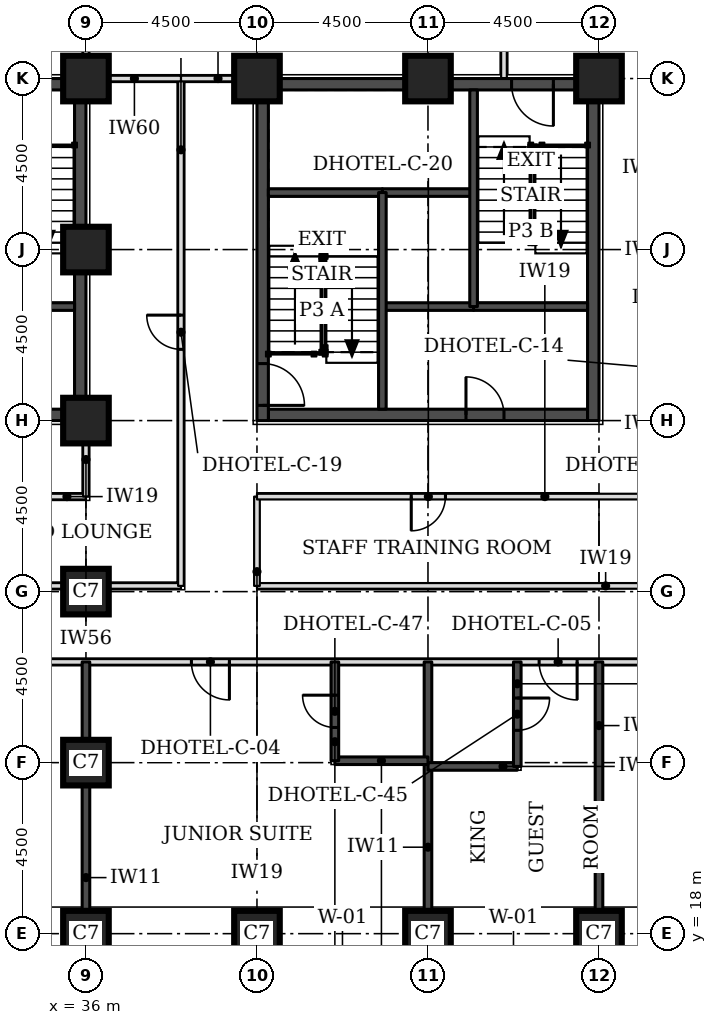
"""IFC4 building model, lengths in metres.
Left out: names, types, materials, properties, quantities, classifications, styles, units other than length and angle.
Written with IfcOpenShell. Run it as: python <this file> out.ifc"""

import sys

from ifc_helpers import new_model, si_unit, direction, frame, frame_2d, origin, origin_2d, place, context, subcontext, project, spatial, rectangle, extrude, element, fill, save


model = new_model("IFC4")
c1 = context("Model", 3, precision=1e-05, world=origin(), true_north=direction((0.0, 1.0)))
c2 = subcontext(c1, "Body", "Model", "MODEL_VIEW")
j1 = project(units=[si_unit("LENGTHUNIT", "METRE"), si_unit("PLANEANGLEUNIT", "RADIAN")], contexts=[c1])
p1 = place(None, origin())
s1 = spatial("IfcSite", under=j1, at=p1, CompositionType="ELEMENT")
p2 = place(p1, origin())
s2 = spatial("IfcBuilding", under=s1, at=p2, CompositionType="ELEMENT")
p3 = place(p2, frame((0.0, 0.0, 33.0)))
s3 = spatial("IfcBuildingStorey", under=s2, at=p3, CompositionType="ELEMENT", Elevation=33.0)
for number, where, z_axis, x_axis in (
    (1, (36.0, 18.0, 0.0), (0.0, 0.0, 1.0), (1.0, 0.0, 0.0)),
    (2, (40.5, 18.0, 0.0), (0.0, 0.0, 1.0), (1.0, 0.0, 0.0)),
    (3, (45.0, 18.0, 0.0), (0.0, 0.0, 1.0), (1.0, 0.0, 0.0)),
    (4, (49.5, 18.0, 0.0), (0.0, 0.0, 1.0), (1.0, 0.0, 0.0)),
    (5, (36.0, 22.5, 0.0), (0.0, 0.0, 1.0), (1.0, 0.0, 0.0)),
    (6, (36.0, 27.0, 0.0), (0.0, 0.0, 1.0), (1.0, 0.0, 0.0)),
    (7, (36.0, 31.5, 0.0), (0.0, 0.0, 1.0), (1.0, 0.0, 0.0)),
    (8, (36.0, 36.0, 0.0), (0.0, 0.0, 1.0), (1.0, 0.0, 0.0)),
    (9, (36.0, 40.5, 0.0), (0.0, 0.0, 1.0), (1.0, 0.0, 0.0)),
    (10, (40.5, 40.5, 0.0), (0.0, 0.0, 1.0), (1.0, 0.0, 0.0)),
    (11, (45.0, 40.5, 0.0), (0.0, 0.0, 1.0), (1.0, 0.0, 0.0)),
    (12, (49.5, 40.5, 0.0), (0.0, 0.0, 1.0), (1.0, 0.0, 0.0)),
):
    element("IfcColumn", number, at=place(p3, frame(where, z_axis=z_axis, x_axis=x_axis)), inside=s3, PredefinedType="COLUMN", context=c2, shape_type="SweptSolid", body=[
        extrude(rectangle(XDim=1.2, YDim=1.2, at=origin_2d()), origin(), (0.0, 0.0, 1.0), 3.3),
    ])
p4 = place(p3, frame((40.8, 31.65, 0.0), z_axis=(0.0, 0.0, 1.0), x_axis=(1.0, 0.0, 0.0)))
e13 = element("IfcWall", 13, at=p4, inside=s3, PredefinedType="SHEAR", context=c2, shape_type="SweptSolid", body=[
    extrude(rectangle(XDim=8.4, YDim=0.3, at=frame_2d((4.2, 0.0))), origin(), (0.0, 0.0, 1.0), 3.3),
])
p5 = place(p4, frame((5.2, 0.0, 0.0)))
e14 = element("IfcOpeningElement", 14, at=p5, cuts=e13, PredefinedType="OPENING", context=c2, shape_type="SweptSolid", body=[
    extrude(rectangle(XDim=1.0, YDim=2.1, at=frame_2d((0.5, 1.05))), frame((0.0, 0.16, 0.0), z_axis=(0.0, -1.0, 0.0), x_axis=(1.0, 0.0, 0.0)), (0.0, 0.0, 1.0), 0.32),
])
p6 = place(p3, frame((40.8, 40.35, 0.0), z_axis=(0.0, 0.0, 1.0), x_axis=(1.0, 0.0, 0.0)))
e15 = element("IfcWall", 15, at=p6, inside=s3, PredefinedType="SHEAR", context=c2, shape_type="SweptSolid", body=[
    extrude(rectangle(XDim=8.4, YDim=0.3, at=frame_2d((4.2, 0.0))), origin(), (0.0, 0.0, 1.0), 3.3),
])
p7 = place(p6, frame((6.4, 0.0, 0.0)))
e16 = element("IfcOpeningElement", 16, at=p7, cuts=e15, PredefinedType="OPENING", context=c2, shape_type="SweptSolid", body=[
    extrude(rectangle(XDim=1.1, YDim=2.1, at=frame_2d((0.55, 1.05))), frame((0.0, 0.16, 0.0), z_axis=(0.0, -1.0, 0.0), x_axis=(1.0, 0.0, 0.0)), (0.0, 0.0, 1.0), 0.32),
])
p8 = place(p3, frame((40.65, 31.5, 0.0), z_axis=(0.0, 0.0, 1.0), x_axis=(0.0, 1.0, 0.0)))
e17 = element("IfcWall", 17, at=p8, inside=s3, PredefinedType="SHEAR", context=c2, shape_type="SweptSolid", body=[
    extrude(rectangle(XDim=9.0, YDim=0.3, at=frame_2d((4.5, 0.0))), origin(), (0.0, 0.0, 1.0), 3.3),
])
p9 = place(p8, frame((0.4, 0.0, 0.0)))
e18 = element("IfcOpeningElement", 18, at=p9, cuts=e17, PredefinedType="OPENING", context=c2, shape_type="SweptSolid", body=[
    extrude(rectangle(XDim=1.1, YDim=2.1, at=frame_2d((0.55, 1.05))), frame((0.0, 0.16, 0.0), z_axis=(0.0, -1.0, 0.0), x_axis=(1.0, 0.0, 0.0)), (0.0, 0.0, 1.0), 0.32),
])
p10 = place(p3, frame((49.35, 31.5, 0.0), z_axis=(0.0, 0.0, 1.0), x_axis=(0.0, 1.0, 0.0)))
e19 = element("IfcWall", 19, at=p10, inside=s3, PredefinedType="SHEAR", context=c2, shape_type="SweptSolid", body=[
    extrude(rectangle(XDim=9.0, YDim=0.3, at=frame_2d((4.5, 0.0))), origin(), (0.0, 0.0, 1.0), 3.3),
])
p11 = place(p3, frame((27.3, 31.65, 0.0), z_axis=(0.0, 0.0, 1.0), x_axis=(1.0, 0.0, 0.0)))
e20 = element("IfcWall", 20, at=p11, inside=s3, PredefinedType="SHEAR", context=c2, shape_type="SweptSolid", body=[
    extrude(rectangle(XDim=8.4, YDim=0.3, at=frame_2d((4.2, 0.0))), origin(), (0.0, 0.0, 1.0), 3.3),
])
p12 = place(p11, frame((4.8, 0.0, 0.0)))
e21 = element("IfcOpeningElement", 21, at=p12, cuts=e20, PredefinedType="OPENING", context=c2, shape_type="SweptSolid", body=[
    extrude(rectangle(XDim=1.8, YDim=2.1, at=frame_2d((0.9, 1.05))), frame((0.0, 0.16, 0.0), z_axis=(0.0, -1.0, 0.0), x_axis=(1.0, 0.0, 0.0)), (0.0, 0.0, 1.0), 0.32),
])
p13 = place(p3, frame((27.3, 40.35, 0.0), z_axis=(0.0, 0.0, 1.0), x_axis=(1.0, 0.0, 0.0)))
e22 = element("IfcWall", 22, at=p13, inside=s3, PredefinedType="SHEAR", context=c2, shape_type="SweptSolid", body=[
    extrude(rectangle(XDim=8.4, YDim=0.3, at=frame_2d((4.2, 0.0))), origin(), (0.0, 0.0, 1.0), 3.3),
])
p14 = place(p13, frame((6.4, 0.0, 0.0)))
e23 = element("IfcOpeningElement", 23, at=p14, cuts=e22, PredefinedType="OPENING", context=c2, shape_type="SweptSolid", body=[
    extrude(rectangle(XDim=1.1, YDim=2.1, at=frame_2d((0.55, 1.05))), frame((0.0, 0.16, 0.0), z_axis=(0.0, -1.0, 0.0), x_axis=(1.0, 0.0, 0.0)), (0.0, 0.0, 1.0), 0.32),
])
p15 = place(p3, frame((35.85, 31.5, 0.0), z_axis=(0.0, 0.0, 1.0), x_axis=(0.0, 1.0, 0.0)))
e24 = element("IfcWall", 24, at=p15, inside=s3, PredefinedType="SHEAR", context=c2, shape_type="SweptSolid", body=[
    extrude(rectangle(XDim=9.0, YDim=0.3, at=frame_2d((4.5, 0.0))), origin(), (0.0, 0.0, 1.0), 3.3),
])
p16 = place(p3, frame((19.15, 25.15, 0.0), z_axis=(0.0, 0.0, 1.0), x_axis=(1.0, 0.0, 0.0)))
e25 = element("IfcWall", 25, at=p16, inside=s3, PredefinedType="PARTITIONING", context=c2, shape_type="SweptSolid", body=[
    extrude(rectangle(XDim=33.7, YDim=0.15, at=frame_2d((16.85, 0.0))), origin(), (0.0, 0.0, 1.0), 3.08),
])
p17 = place(p16, frame((4.175, 0.0, 0.0)))
e26 = element("IfcOpeningElement", 26, at=p17, cuts=e25, PredefinedType="OPENING", context=c2, shape_type="SweptSolid", body=[
    extrude(rectangle(XDim=1.0, YDim=2.1, at=frame_2d((0.5, 1.05))), frame((0.0, 0.085, 0.0), z_axis=(0.0, -1.0, 0.0), x_axis=(1.0, 0.0, 0.0)), (0.0, 0.0, 1.0), 0.17),
])
p18 = place(p16, frame((13.325, 0.0, 0.0)))
e27 = element("IfcOpeningElement", 27, at=p18, cuts=e25, PredefinedType="OPENING", context=c2, shape_type="SweptSolid", body=[
    extrude(rectangle(XDim=1.0, YDim=2.1, at=frame_2d((0.5, 1.05))), frame((0.0, 0.085, 0.0), z_axis=(0.0, -1.0, 0.0), x_axis=(1.0, 0.0, 0.0)), (0.0, 0.0, 1.0), 0.17),
])
p19 = place(p16, frame((19.625, 0.0, 0.0)))
e28 = element("IfcOpeningElement", 28, at=p19, cuts=e25, PredefinedType="OPENING", context=c2, shape_type="SweptSolid", body=[
    extrude(rectangle(XDim=1.0, YDim=2.1, at=frame_2d((0.5, 1.05))), frame((0.0, 0.085, 0.0), z_axis=(0.0, -1.0, 0.0), x_axis=(1.0, 0.0, 0.0)), (0.0, 0.0, 1.0), 0.17),
])
p20 = place(p16, frame((28.775, 0.0, 0.0)))
e29 = element("IfcOpeningElement", 29, at=p20, cuts=e25, PredefinedType="OPENING", context=c2, shape_type="SweptSolid", body=[
    extrude(rectangle(XDim=1.0, YDim=2.1, at=frame_2d((0.5, 1.05))), frame((0.0, 0.085, 0.0), z_axis=(0.0, -1.0, 0.0), x_axis=(1.0, 0.0, 0.0)), (0.0, 0.0, 1.0), 0.17),
])
p21 = place(p16, frame((1.175, 0.0, 0.0)))
e30 = element("IfcOpeningElement", 30, at=p21, cuts=e25, PredefinedType="OPENING", context=c2, shape_type="SweptSolid", body=[
    extrude(rectangle(XDim=1.0, YDim=2.1, at=frame_2d((0.5, 1.05))), frame((0.0, 0.085, 0.0), z_axis=(0.0, -1.0, 0.0), x_axis=(1.0, 0.0, 0.0)), (0.0, 0.0, 1.0), 0.17),
])
p22 = place(p16, frame((31.525, 0.0, 0.0)))
e31 = element("IfcOpeningElement", 31, at=p22, cuts=e25, PredefinedType="OPENING", context=c2, shape_type="SweptSolid", body=[
    extrude(rectangle(XDim=1.0, YDim=2.1, at=frame_2d((0.5, 1.05))), frame((0.0, 0.085, 0.0), z_axis=(0.0, -1.0, 0.0), x_axis=(1.0, 0.0, 0.0)), (0.0, 0.0, 1.0), 0.17),
])
p23 = place(p3, frame((27.0, 27.15, 0.0), z_axis=(0.0, 0.0, 1.0), x_axis=(1.0, 0.0, 0.0)))
e32 = element("IfcWall", 32, at=p23, inside=s3, PredefinedType="PARTITIONING", context=c2, shape_type="SweptSolid", body=[
    extrude(rectangle(XDim=11.5, YDim=0.15, at=frame_2d((5.75, 0.0))), origin(), (0.0, 0.0, 1.0), 3.08),
])
p24 = place(p3, frame((38.5, 27.15, 0.0), z_axis=(0.0, 0.0, 1.0), x_axis=(0.0, 1.0, 0.0)))
e33 = element("IfcWall", 33, at=p24, inside=s3, PredefinedType="PARTITIONING", context=c2, shape_type="SweptSolid", body=[
    extrude(rectangle(XDim=13.35, YDim=0.15, at=frame_2d((6.675, 0.0))), origin(), (0.0, 0.0, 1.0), 3.08),
])
p25 = place(p24, frame((6.225, 0.0, 0.0)))
e34 = element("IfcOpeningElement", 34, at=p25, cuts=e33, PredefinedType="OPENING", context=c2, shape_type="SweptSolid", body=[
    extrude(rectangle(XDim=0.9, YDim=2.1, at=frame_2d((0.45, 1.05))), frame((0.0, 0.085, 0.0), z_axis=(0.0, -1.0, 0.0), x_axis=(1.0, 0.0, 0.0)), (0.0, 0.0, 1.0), 0.17),
])
p26 = place(p3, frame((40.5, 27.15, 0.0), z_axis=(0.0, 0.0, 1.0), x_axis=(1.0, 0.0, 0.0)))
e35 = element("IfcWall", 35, at=p26, inside=s3, PredefinedType="PARTITIONING", context=c2, shape_type="SweptSolid", body=[
    extrude(rectangle(XDim=10.35, YDim=0.15, at=frame_2d((5.175, 0.0))), origin(), (0.0, 0.0, 1.0), 3.08),
])
p27 = place(p3, frame((40.5, 27.15, 0.0), z_axis=(0.0, 0.0, 1.0), x_axis=(0.0, 1.0, 0.0)))
e36 = element("IfcWall", 36, at=p27, inside=s3, PredefinedType="PARTITIONING", context=c2, shape_type="SweptSolid", body=[
    extrude(rectangle(XDim=2.35, YDim=0.15, at=frame_2d((1.175, 0.0))), origin(), (0.0, 0.0, 1.0), 3.08),
])
p28 = place(p3, frame((27.0, 29.5, 0.0), z_axis=(0.0, 0.0, 1.0), x_axis=(1.0, 0.0, 0.0)))
e37 = element("IfcWall", 37, at=p28, inside=s3, PredefinedType="PARTITIONING", context=c2, shape_type="SweptSolid", body=[
    extrude(rectangle(XDim=9.0, YDim=0.15, at=frame_2d((4.5, 0.0))), origin(), (0.0, 0.0, 1.0), 3.08),
])
p29 = place(p3, frame((36.0, 29.5, 0.0), z_axis=(0.0, 0.0, 1.0), x_axis=(0.0, 1.0, 0.0)))
e38 = element("IfcWall", 38, at=p29, inside=s3, PredefinedType="PARTITIONING", context=c2, shape_type="SweptSolid", body=[
    extrude(rectangle(XDim=1.95, YDim=0.15, at=frame_2d((0.975, 0.0))), origin(), (0.0, 0.0, 1.0), 2.33),
])
p30 = place(p3, frame((40.5, 29.5, 0.0), z_axis=(0.0, 0.0, 1.0), x_axis=(1.0, 0.0, 0.0)))
e39 = element("IfcWall", 39, at=p30, inside=s3, PredefinedType="PARTITIONING", context=c2, shape_type="SweptSolid", body=[
    extrude(rectangle(XDim=10.35, YDim=0.15, at=frame_2d((5.175, 0.0))), origin(), (0.0, 0.0, 1.0), 3.08),
])
p31 = place(p30, frame((4.06, 0.0, 0.0)))
e40 = element("IfcOpeningElement", 40, at=p31, cuts=e39, PredefinedType="OPENING", context=c2, shape_type="SweptSolid", body=[
    extrude(rectangle(XDim=0.9, YDim=2.1, at=frame_2d((0.45, 1.05))), frame((0.0, 0.085, 0.0), z_axis=(0.0, -1.0, 0.0), x_axis=(1.0, 0.0, 0.0)), (0.0, 0.0, 1.0), 0.17),
])
p32 = place(p3, frame((38.5, 40.5, 0.0), z_axis=(0.0, 0.0, 1.0), x_axis=(1.0, 0.0, 0.0)))
e41 = element("IfcWall", 41, at=p32, inside=s3, PredefinedType="PARTITIONING", context=c2, shape_type="SweptSolid", body=[
    extrude(rectangle(XDim=1.95, YDim=0.15, at=frame_2d((0.975, 0.0))), origin(), (0.0, 0.0, 1.0), 2.33),
])
p33 = place(p3, frame((36.0, 40.55, 0.0), z_axis=(0.0, 0.0, 1.0), x_axis=(0.0, 1.0, 0.0)))
e42 = element("IfcWall", 42, at=p33, inside=s3, PredefinedType="PARTITIONING", context=c2, shape_type="SweptSolid", body=[
    extrude(rectangle(XDim=4.4, YDim=0.15, at=frame_2d((2.2, 0.0))), origin(), (0.0, 0.0, 1.0), 2.33),
])
p34 = place(p3, frame((47.0, 40.5, 0.0), z_axis=(0.0, 0.0, 1.0), x_axis=(0.0, 1.0, 0.0)))
e43 = element("IfcWall", 43, at=p34, inside=s3, PredefinedType="PARTITIONING", context=c2, shape_type="SweptSolid", body=[
    extrude(rectangle(XDim=7.0, YDim=0.15, at=frame_2d((3.5, 0.0))), origin(), (0.0, 0.0, 1.0), 3.08),
])
p35 = place(p34, frame((3.05, 0.0, 0.0)))
e44 = element("IfcOpeningElement", 44, at=p35, cuts=e43, PredefinedType="OPENING", context=c2, shape_type="SweptSolid", body=[
    extrude(rectangle(XDim=0.9, YDim=2.1, at=frame_2d((0.45, 1.05))), frame((0.0, 0.085, 0.0), z_axis=(0.0, -1.0, 0.0), x_axis=(1.0, 0.0, 0.0)), (0.0, 0.0, 1.0), 0.17),
])
for number, where, z_axis, x_axis in (
    (45, (36.0, 18.6, 0.0), (0.0, 0.0, 1.0), (0.0, 1.0, 0.0)),
    (46, (45.0, 18.6, 0.0), (0.0, 0.0, 1.0), (0.0, 1.0, 0.0)),
    (47, (49.5, 18.6, 0.0), (0.0, 0.0, 1.0), (0.0, 1.0, 0.0)),
):
    element("IfcWall", number, at=place(p3, frame(where, z_axis=z_axis, x_axis=x_axis)), inside=s3, PredefinedType="SOLIDWALL", context=c2, shape_type="SweptSolid", body=[
        extrude(rectangle(XDim=6.55, YDim=0.2, at=frame_2d((3.275, 0.0))), origin(), (0.0, 0.0, 1.0), 3.08),
    ])
p36 = place(p3, frame((45.0, 22.4, 0.0), z_axis=(0.0, 0.0, 1.0), x_axis=(1.0, 0.0, 0.0)))
e48 = element("IfcWall", 48, at=p36, inside=s3, PredefinedType="SOLIDWALL", context=c2, shape_type="SweptSolid", body=[
    extrude(rectangle(XDim=2.35, YDim=0.2, at=frame_2d((1.175, 0.0))), origin(), (0.0, 0.0, 1.0), 3.08),
])
p37 = place(p3, frame((47.35, 22.4, 0.0), z_axis=(0.0, 0.0, 1.0), x_axis=(0.0, 1.0, 0.0)))
e49 = element("IfcWall", 49, at=p37, inside=s3, PredefinedType="SOLIDWALL", context=c2, shape_type="SweptSolid", body=[
    extrude(rectangle(XDim=2.75, YDim=0.2, at=frame_2d((1.375, 0.0))), origin(), (0.0, 0.0, 1.0), 3.08),
])
p38 = place(p37, frame((0.95, 0.0, 0.0)))
e50 = element("IfcOpeningElement", 50, at=p38, cuts=e49, PredefinedType="OPENING", context=c2, shape_type="SweptSolid", body=[
    extrude(rectangle(XDim=0.85, YDim=2.1, at=frame_2d((0.425, 1.05))), frame((0.0, 0.11, 0.0), z_axis=(0.0, -1.0, 0.0), x_axis=(1.0, 0.0, 0.0)), (0.0, 0.0, 1.0), 0.22),
])
p39 = place(p3, frame((42.55, 22.55, 0.0), z_axis=(0.0, 0.0, 1.0), x_axis=(1.0, 0.0, 0.0)))
e51 = element("IfcWall", 51, at=p39, inside=s3, PredefinedType="SOLIDWALL", context=c2, shape_type="SweptSolid", body=[
    extrude(rectangle(XDim=2.45, YDim=0.2, at=frame_2d((1.225, 0.0))), origin(), (0.0, 0.0, 1.0), 3.08),
])
p40 = place(p3, frame((42.55, 22.55, 0.0), z_axis=(0.0, 0.0, 1.0), x_axis=(0.0, 1.0, 0.0)))
e52 = element("IfcWall", 52, at=p40, inside=s3, PredefinedType="SOLIDWALL", context=c2, shape_type="SweptSolid", body=[
    extrude(rectangle(XDim=2.6, YDim=0.2, at=frame_2d((1.3, 0.0))), origin(), (0.0, 0.0, 1.0), 3.08),
])
p41 = place(p40, frame((0.875, 0.0, 0.0)))
e53 = element("IfcOpeningElement", 53, at=p41, cuts=e52, PredefinedType="OPENING", context=c2, shape_type="SweptSolid", body=[
    extrude(rectangle(XDim=0.85, YDim=2.1, at=frame_2d((0.425, 1.05))), frame((0.0, 0.11, 0.0), z_axis=(0.0, -1.0, 0.0), x_axis=(1.0, 0.0, 0.0)), (0.0, 0.0, 1.0), 0.22),
])
p42 = place(p3, frame((36.05, 40.5, 0.0), z_axis=(0.0, 0.0, 1.0), x_axis=(1.0, 0.0, 0.0)))
e54 = element("IfcWall", 54, at=p42, inside=s3, PredefinedType="PARTITIONING", context=c2, shape_type="SweptSolid", body=[
    extrude(rectangle(XDim=2.45, YDim=0.15, at=frame_2d((1.225, 0.0))), origin(), (0.0, 0.0, 1.0), 2.33),
])
p43 = place(p3, frame((43.8, 34.5, 0.0), z_axis=(0.0, 0.0, 1.0), x_axis=(1.0, 0.0, 0.0)))
e55 = element("IfcWall", 55, at=p43, inside=s3, PredefinedType="SOLIDWALL", context=c2, shape_type="SweptSolid", body=[
    extrude(rectangle(XDim=2.4, YDim=0.2, at=frame_2d((1.2, 0.0))), origin(), (0.0, 0.0, 1.0), 3.08),
])
p44 = place(p3, frame((46.2, 34.5, 0.0), z_axis=(0.0, 0.0, 1.0), x_axis=(1.0, 0.0, 0.0)))
e56 = element("IfcWall", 56, at=p44, inside=s3, PredefinedType="SOLIDWALL", context=c2, shape_type="SweptSolid", body=[
    extrude(rectangle(XDim=3.0, YDim=0.2, at=frame_2d((1.5, 0.0))), origin(), (0.0, 0.0, 1.0), 3.08),
])
p45 = place(p3, frame((43.8, 37.5, 0.0), z_axis=(0.0, 0.0, 1.0), x_axis=(1.0, 0.0, 0.0)))
e57 = element("IfcWall", 57, at=p45, inside=s3, PredefinedType="SOLIDWALL", context=c2, shape_type="SweptSolid", body=[
    extrude(rectangle(XDim=2.4, YDim=0.2, at=frame_2d((1.2, 0.0))), origin(), (0.0, 0.0, 1.0), 3.3),
])
p46 = place(p3, frame((40.8, 37.5, 0.0), z_axis=(0.0, 0.0, 1.0), x_axis=(1.0, 0.0, 0.0)))
e58 = element("IfcWall", 58, at=p46, inside=s3, PredefinedType="SOLIDWALL", context=c2, shape_type="SweptSolid", body=[
    extrude(rectangle(XDim=3.0, YDim=0.2, at=frame_2d((1.5, 0.0))), origin(), (0.0, 0.0, 1.0), 3.08),
])
for number, where, z_axis, x_axis in (
    (59, (43.8, 31.8, 0.0), (0.0, 0.0, 1.0), (0.0, 1.0, 0.0)),
    (60, (46.2, 34.5, 0.0), (0.0, 0.0, 1.0), (0.0, 1.0, 0.0)),
):
    element("IfcWall", number, at=place(p3, frame(where, z_axis=z_axis, x_axis=x_axis)), inside=s3, PredefinedType="SOLIDWALL", context=c2, shape_type="SweptSolid", body=[
        extrude(rectangle(XDim=5.7, YDim=0.2, at=frame_2d((2.85, 0.0))), origin(), (0.0, 0.0, 1.0), 3.08),
    ])
p47 = place(p3, frame((30.3, 34.5, 0.0), z_axis=(0.0, 0.0, 1.0), x_axis=(1.0, 0.0, 0.0)))
e61 = element("IfcWall", 61, at=p47, inside=s3, PredefinedType="SOLIDWALL", context=c2, shape_type="SweptSolid", body=[
    extrude(rectangle(XDim=5.4, YDim=0.2, at=frame_2d((2.7, 0.0))), origin(), (0.0, 0.0, 1.0), 3.08),
])
p48 = place(p47, frame((0.45, 0.0, 0.0)))
e62 = element("IfcOpeningElement", 62, at=p48, cuts=e61, PredefinedType="OPENING", context=c2, shape_type="SweptSolid", body=[
    extrude(rectangle(XDim=1.5, YDim=2.1, at=frame_2d((0.75, 1.05))), frame((0.0, 0.11, 0.0), z_axis=(0.0, -1.0, 0.0), x_axis=(1.0, 0.0, 0.0)), (0.0, 0.0, 1.0), 0.22),
])
p49 = place(p19, frame((1.0, 0.0, 0.0), z_axis=(0.0, 0.0, 1.0), x_axis=(-1.0, 0.0, 0.0)))
e63 = element("IfcDoor", 63, at=p49, inside=s3, OperationType="SINGLE_SWING_LEFT", PredefinedType="DOOR", context=c2, shape_type="SweptSolid", body=[
    extrude(rectangle(XDim=1.0, YDim=2.1, at=frame_2d((0.5, 1.05))), frame((0.0, 0.025, 0.0), z_axis=(0.0, -1.0, 0.0), x_axis=(1.0, 0.0, 0.0)), (0.0, 0.0, 1.0), 0.05),
])
fill(e28, e63)
p50 = place(p41, origin())
e64 = element("IfcDoor", 64, at=p50, inside=s3, OperationType="SINGLE_SWING_RIGHT", PredefinedType="DOOR", context=c2, shape_type="SweptSolid", body=[
    extrude(rectangle(XDim=0.85, YDim=2.1, at=frame_2d((0.425, 1.05))), frame((0.0, 0.025, 0.0), z_axis=(0.0, -1.0, 0.0), x_axis=(1.0, 0.0, 0.0)), (0.0, 0.0, 1.0), 0.05),
])
fill(e53, e64)
p51 = place(p20, frame((1.0, 0.0, 0.0), z_axis=(0.0, 0.0, 1.0), x_axis=(-1.0, 0.0, 0.0)))
e65 = element("IfcDoor", 65, at=p51, inside=s3, OperationType="SINGLE_SWING_LEFT", PredefinedType="DOOR", context=c2, shape_type="SweptSolid", body=[
    extrude(rectangle(XDim=1.0, YDim=2.1, at=frame_2d((0.5, 1.05))), frame((0.0, 0.025, 0.0), z_axis=(0.0, -1.0, 0.0), x_axis=(1.0, 0.0, 0.0)), (0.0, 0.0, 1.0), 0.05),
])
fill(e29, e65)
p52 = place(p38, frame((0.85, 0.0, 0.0), z_axis=(0.0, 0.0, 1.0), x_axis=(-1.0, 0.0, 0.0)))
e66 = element("IfcDoor", 66, at=p52, inside=s3, OperationType="SINGLE_SWING_LEFT", PredefinedType="DOOR", context=c2, shape_type="SweptSolid", body=[
    extrude(rectangle(XDim=0.85, YDim=2.1, at=frame_2d((0.425, 1.05))), frame((0.0, 0.025, 0.0), z_axis=(0.0, -1.0, 0.0), x_axis=(1.0, 0.0, 0.0)), (0.0, 0.0, 1.0), 0.05),
])
fill(e50, e66)
p53 = place(p25, origin())
e67 = element("IfcDoor", 67, at=p53, inside=s3, OperationType="SINGLE_SWING_RIGHT", PredefinedType="DOOR", context=c2, shape_type="SweptSolid", body=[
    extrude(rectangle(XDim=0.9, YDim=2.1, at=frame_2d((0.45, 1.05))), frame((0.0, 0.025, 0.0), z_axis=(0.0, -1.0, 0.0), x_axis=(1.0, 0.0, 0.0)), (0.0, 0.0, 1.0), 0.05),
])
fill(e34, e67)
p54 = place(p31, frame((0.9, 0.0, 0.0), z_axis=(0.0, 0.0, 1.0), x_axis=(-1.0, 0.0, 0.0)))
e68 = element("IfcDoor", 68, at=p54, inside=s3, OperationType="SINGLE_SWING_RIGHT", PredefinedType="DOOR", context=c2, shape_type="SweptSolid", body=[
    extrude(rectangle(XDim=0.9, YDim=2.1, at=frame_2d((0.45, 1.05))), frame((0.0, 0.025, 0.0), z_axis=(0.0, -1.0, 0.0), x_axis=(1.0, 0.0, 0.0)), (0.0, 0.0, 1.0), 0.05),
])
fill(e40, e68)
p55 = place(p9, frame((1.1, 0.0, 0.0), z_axis=(0.0, 0.0, 1.0), x_axis=(-1.0, 0.0, 0.0)))
e69 = element("IfcDoor", 69, at=p55, inside=s3, OperationType="SINGLE_SWING_RIGHT", PredefinedType="DOOR", context=c2, shape_type="SweptSolid", body=[
    extrude(rectangle(XDim=1.1, YDim=2.1, at=frame_2d((0.55, 1.05))), frame((0.0, 0.025, 0.0), z_axis=(0.0, -1.0, 0.0), x_axis=(1.0, 0.0, 0.0)), (0.0, 0.0, 1.0), 0.05),
])
fill(e18, e69)
p56 = place(p7, frame((1.1, 0.0, 0.0), z_axis=(0.0, 0.0, 1.0), x_axis=(-1.0, 0.0, 0.0)))
e70 = element("IfcDoor", 70, at=p56, inside=s3, OperationType="SINGLE_SWING_LEFT", PredefinedType="DOOR", context=c2, shape_type="SweptSolid", body=[
    extrude(rectangle(XDim=1.1, YDim=2.1, at=frame_2d((0.55, 1.05))), frame((0.0, 0.025, 0.0), z_axis=(0.0, -1.0, 0.0), x_axis=(1.0, 0.0, 0.0)), (0.0, 0.0, 1.0), 0.05),
])
fill(e16, e70)
p57 = place(p5, origin())
e71 = element("IfcDoor", 71, at=p57, inside=s3, OperationType="SINGLE_SWING_LEFT", PredefinedType="DOOR", context=c2, shape_type="SweptSolid", body=[
    extrude(rectangle(XDim=1.0, YDim=2.1, at=frame_2d((0.5, 1.05))), frame((0.0, 0.025, 0.0), z_axis=(0.0, -1.0, 0.0), x_axis=(1.0, 0.0, 0.0)), (0.0, 0.0, 1.0), 0.05),
])
fill(e14, e71)
save(model, sys.argv[1])
